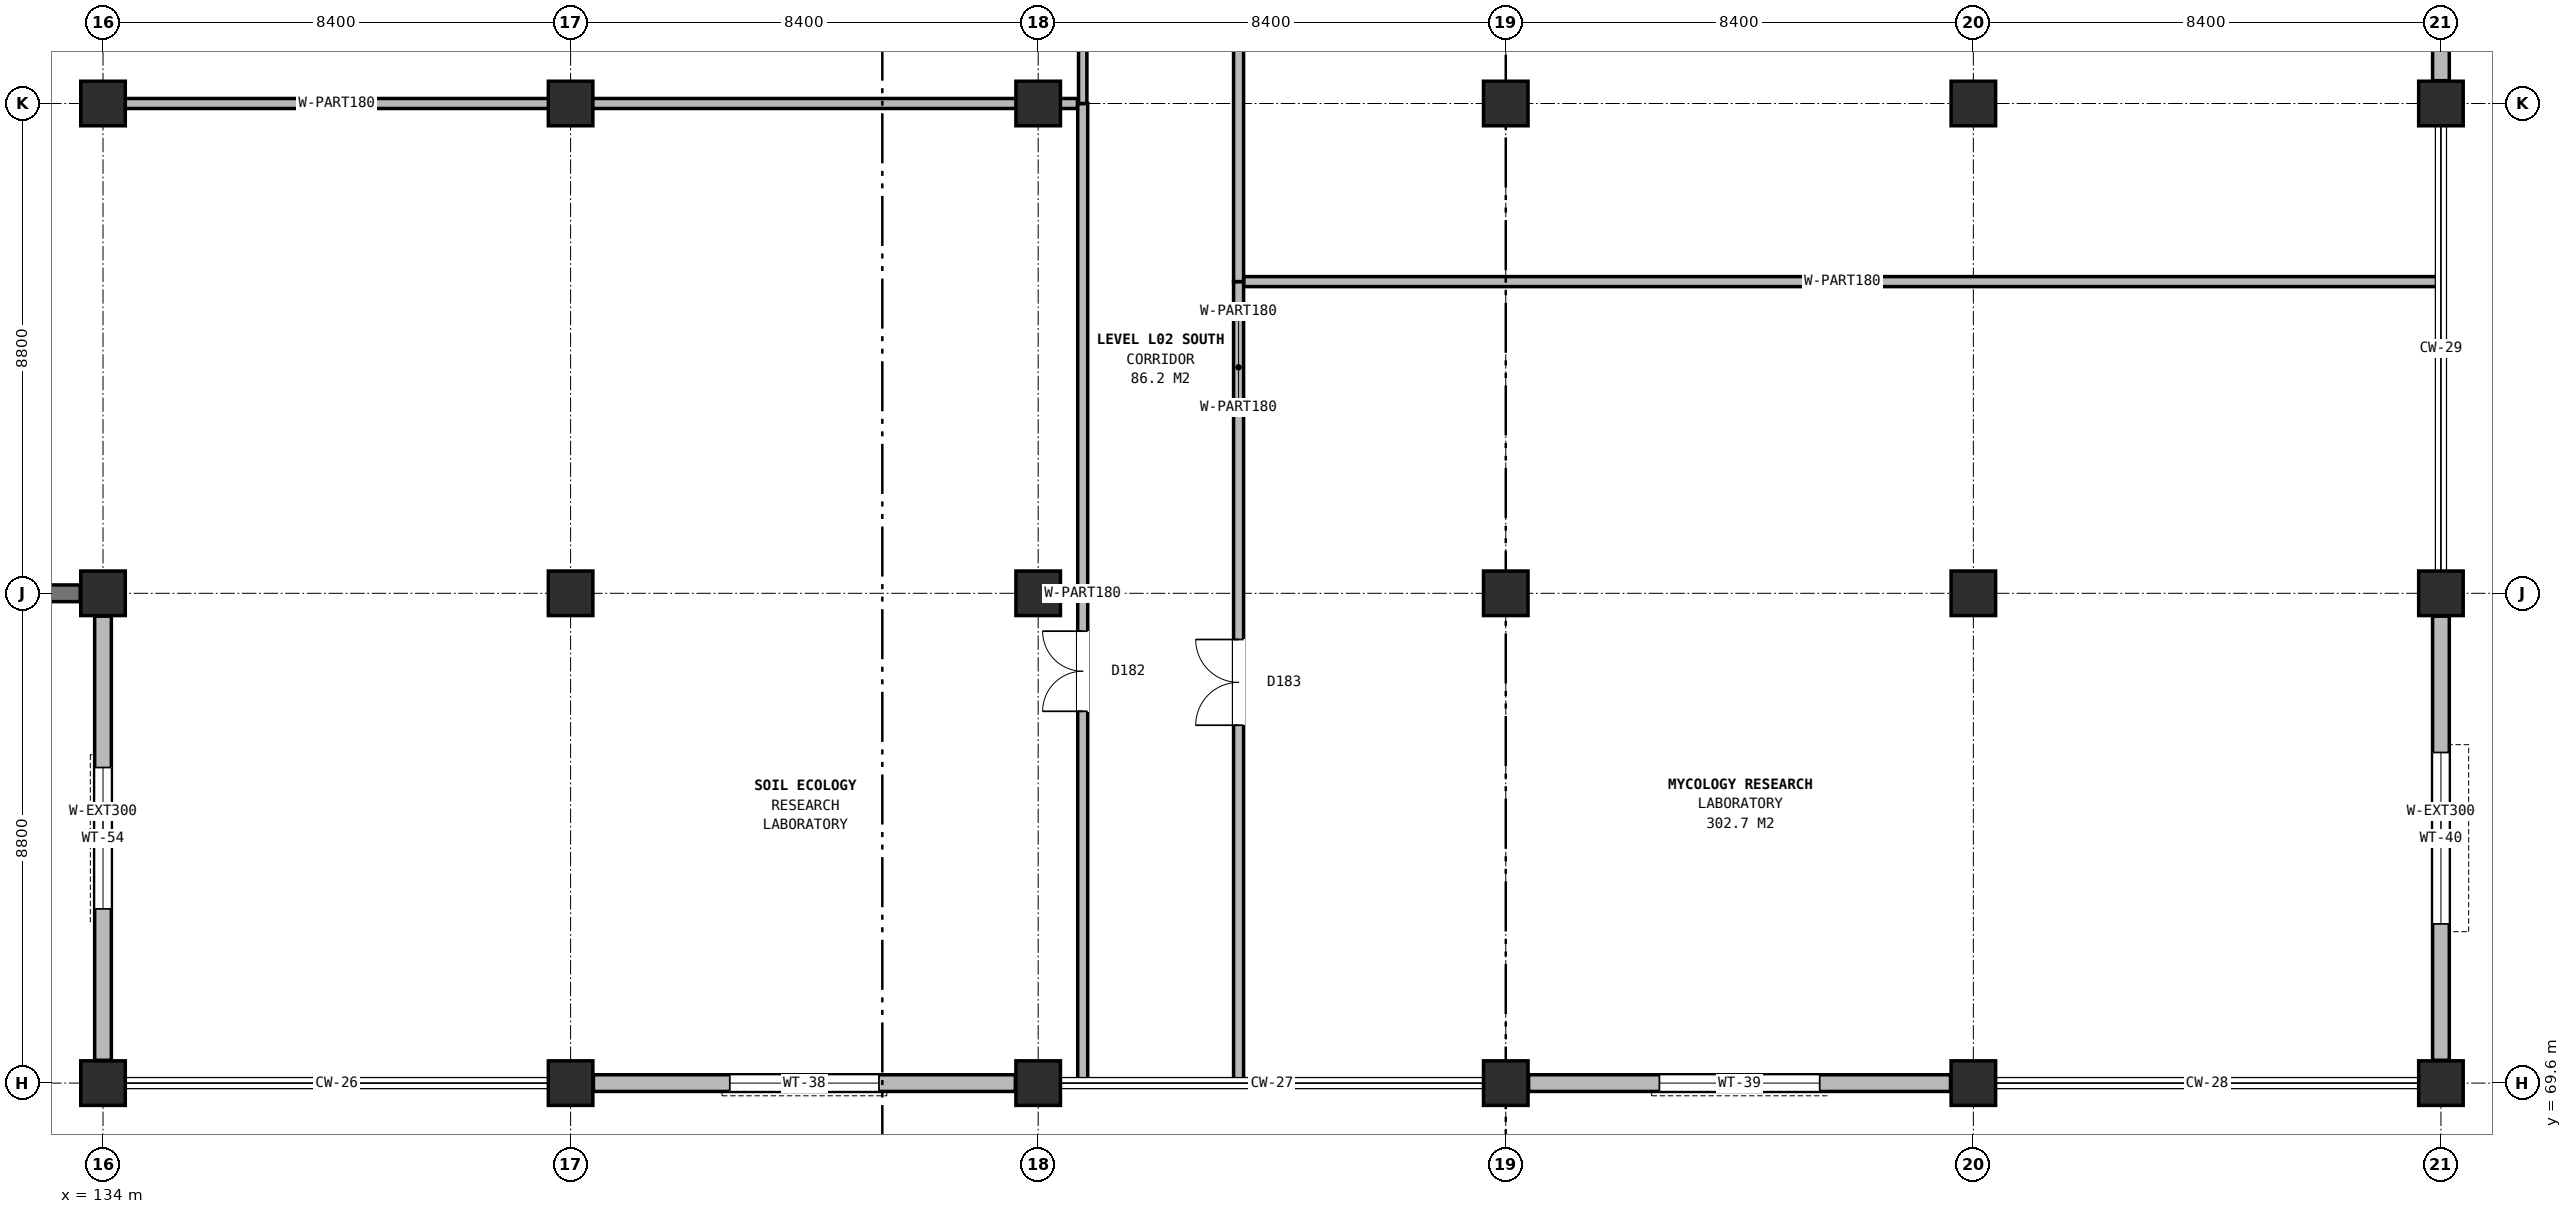
"""IFC4 building model, lengths in metres.
Left out: names, types, materials, properties, quantities, classifications, styles, units other than length and angle.
Written with IfcOpenShell. Run it as: python <this file> out.ifc"""

import sys

from ifc_helpers import new_model, si_unit, direction, frame, frame_2d, origin, origin_2d, place, context, subcontext, project, spatial, rectangle, extrude, element, fill, save


model = new_model("IFC4")
c1 = context("Model", 3, precision=1e-05, world=origin(), true_north=direction((0.0, 1.0)))
c2 = subcontext(c1, "Body", "Model", "MODEL_VIEW")
j1 = project(units=[si_unit("LENGTHUNIT", "METRE"), si_unit("PLANEANGLEUNIT", "RADIAN")], contexts=[c1])
p1 = place(None, origin())
s1 = spatial("IfcSite", under=j1, at=p1, CompositionType="ELEMENT")
p2 = place(p1, origin())
s2 = spatial("IfcBuilding", under=s1, at=p2, CompositionType="ELEMENT")
p3 = place(p2, frame((0.0, 0.0, 9.0)))
s3 = spatial("IfcBuildingStorey", under=s2, at=p3, CompositionType="ELEMENT", Elevation=9.0)
for number, where, z_axis, x_axis in (
    (1, (134.0, 69.6, 0.0), (0.0, 0.0, 1.0), (1.0, 0.0, 0.0)),
    (2, (134.0, 78.4, 0.0), (0.0, 0.0, 1.0), (1.0, 0.0, 0.0)),
    (3, (134.0, 87.2, 0.0), (0.0, 0.0, 1.0), (1.0, 0.0, 0.0)),
    (4, (142.4, 69.6, 0.0), (0.0, 0.0, 1.0), (1.0, 0.0, 0.0)),
    (5, (142.4, 78.4, 0.0), (0.0, 0.0, 1.0), (1.0, 0.0, 0.0)),
    (6, (142.4, 87.2, 0.0), (0.0, 0.0, 1.0), (1.0, 0.0, 0.0)),
    (7, (150.8, 69.6, 0.0), (0.0, 0.0, 1.0), (1.0, 0.0, 0.0)),
    (8, (150.8, 78.4, 0.0), (0.0, 0.0, 1.0), (1.0, 0.0, 0.0)),
    (9, (150.8, 87.2, 0.0), (0.0, 0.0, 1.0), (1.0, 0.0, 0.0)),
    (10, (159.2, 69.6, 0.0), (0.0, 0.0, 1.0), (1.0, 0.0, 0.0)),
    (11, (159.2, 78.4, 0.0), (0.0, 0.0, 1.0), (1.0, 0.0, 0.0)),
    (12, (159.2, 87.2, 0.0), (0.0, 0.0, 1.0), (1.0, 0.0, 0.0)),
    (13, (167.6, 69.6, 0.0), (0.0, 0.0, 1.0), (1.0, 0.0, 0.0)),
    (14, (167.6, 78.4, 0.0), (0.0, 0.0, 1.0), (1.0, 0.0, 0.0)),
    (15, (167.6, 87.2, 0.0), (0.0, 0.0, 1.0), (1.0, 0.0, 0.0)),
    (16, (176.0, 69.6, 0.0), (0.0, 0.0, 1.0), (1.0, 0.0, 0.0)),
    (17, (176.0, 78.4, 0.0), (0.0, 0.0, 1.0), (1.0, 0.0, 0.0)),
    (18, (176.0, 87.2, 0.0), (0.0, 0.0, 1.0), (1.0, 0.0, 0.0)),
):
    element("IfcColumn", number, at=place(p3, frame(where, z_axis=z_axis, x_axis=x_axis)), inside=s3, PredefinedType="COLUMN", context=c2, shape_type="SweptSolid", body=[
        extrude(rectangle(XDim=0.8, YDim=0.8, at=origin_2d()), origin(), (0.0, 0.0, 1.0), 4.2),
    ])
p4 = place(p3, frame((142.81, 69.6, 0.0), z_axis=(0.0, 0.0, 1.0), x_axis=(1.0, 0.0, 0.0)))
e19 = element("IfcWall", 19, at=p4, inside=s3, PredefinedType="SOLIDWALL", context=c2, shape_type="SweptSolid", body=[
    extrude(rectangle(XDim=7.58, YDim=0.3, at=frame_2d((3.79, 0.0))), origin(), (0.0, 0.0, 1.0), 3.45),
])
p5 = place(p4, frame((2.45, 0.0, 0.9)))
e20 = element("IfcOpeningElement", 20, at=p5, cuts=e19, PredefinedType="OPENING", context=c2, shape_type="SweptSolid", body=[
    extrude(rectangle(XDim=2.68, YDim=2.12, at=frame_2d((1.34, 1.06))), frame((0.0, 0.16, 0.0), z_axis=(0.0, -1.0, 0.0), x_axis=(1.0, 0.0, 0.0)), (0.0, 0.0, 1.0), 0.32),
])
p6 = place(p3, frame((159.61, 69.6, 0.0), z_axis=(0.0, 0.0, 1.0), x_axis=(1.0, 0.0, 0.0)))
e21 = element("IfcWall", 21, at=p6, inside=s3, PredefinedType="SOLIDWALL", context=c2, shape_type="SweptSolid", body=[
    extrude(rectangle(XDim=7.58, YDim=0.3, at=frame_2d((3.79, 0.0))), origin(), (0.0, 0.0, 1.0), 3.45),
])
p7 = place(p6, frame((2.35, 0.0, 0.9)))
e22 = element("IfcOpeningElement", 22, at=p7, cuts=e21, PredefinedType="OPENING", context=c2, shape_type="SweptSolid", body=[
    extrude(rectangle(XDim=2.88, YDim=2.14, at=frame_2d((1.44, 1.07))), frame((0.0, 0.16, 0.0), z_axis=(0.0, -1.0, 0.0), x_axis=(1.0, 0.0, 0.0)), (0.0, 0.0, 1.0), 0.32),
])
p8 = place(p3, frame((176.0, 70.01, 0.0), z_axis=(0.0, 0.0, 1.0), x_axis=(0.0, 1.0, 0.0)))
e23 = element("IfcWall", 23, at=p8, inside=s3, PredefinedType="SOLIDWALL", context=c2, shape_type="SweptSolid", body=[
    extrude(rectangle(XDim=7.98, YDim=0.3, at=frame_2d((3.99, 0.0))), origin(), (0.0, 0.0, 1.0), 3.45),
])
p9 = place(p8, frame((2.45, 0.0, 0.9)))
e24 = element("IfcOpeningElement", 24, at=p9, cuts=e23, PredefinedType="OPENING", context=c2, shape_type="SweptSolid", body=[
    extrude(rectangle(XDim=3.08, YDim=2.18, at=frame_2d((1.54, 1.09))), frame((0.0, 0.16, 0.0), z_axis=(0.0, -1.0, 0.0), x_axis=(1.0, 0.0, 0.0)), (0.0, 0.0, 1.0), 0.32),
])
p10 = place(p3, frame((176.0, 87.61, 0.0), z_axis=(0.0, 0.0, 1.0), x_axis=(0.0, 1.0, 0.0)))
e25 = element("IfcWall", 25, at=p10, inside=s3, PredefinedType="SOLIDWALL", context=c2, shape_type="SweptSolid", body=[
    extrude(rectangle(XDim=7.98, YDim=0.3, at=frame_2d((3.99, 0.0))), origin(), (0.0, 0.0, 1.0), 3.45),
])
p11 = place(p10, frame((3.3, 0.0, 0.9)))
e26 = element("IfcOpeningElement", 26, at=p11, cuts=e25, PredefinedType="OPENING", context=c2, shape_type="SweptSolid", body=[
    extrude(rectangle(XDim=1.38, YDim=2.24, at=frame_2d((0.69, 1.12))), frame((0.0, 0.16, 0.0), z_axis=(0.0, -1.0, 0.0), x_axis=(1.0, 0.0, 0.0)), (0.0, 0.0, 1.0), 0.32),
])
p12 = place(p3, frame((126.01, 78.4, 0.0), z_axis=(0.0, 0.0, 1.0), x_axis=(1.0, 0.0, 0.0)))
e27 = element("IfcWall", 27, at=p12, inside=s3, PredefinedType="SHEAR", context=c2, shape_type="SweptSolid", body=[
    extrude(rectangle(XDim=7.58, YDim=0.3, at=frame_2d((3.79, 0.0))), origin(), (0.0, 0.0, 1.0), 3.25),
])
p13 = place(p3, frame((134.0, 77.99, 0.0), z_axis=(0.0, 0.0, 1.0), x_axis=(0.0, -1.0, 0.0)))
e28 = element("IfcWall", 28, at=p13, inside=s3, PredefinedType="SOLIDWALL", context=c2, shape_type="SweptSolid", body=[
    extrude(rectangle(XDim=7.98, YDim=0.3, at=frame_2d((3.99, 0.0))), origin(), (0.0, 0.0, 1.0), 3.25),
])
p14 = place(p13, frame((2.72, 0.0, 0.9)))
e29 = element("IfcOpeningElement", 29, at=p14, cuts=e28, PredefinedType="OPENING", context=c2, shape_type="SweptSolid", body=[
    extrude(rectangle(XDim=2.54, YDim=2.16, at=frame_2d((1.27, 1.08))), frame((0.0, 0.16, 0.0), z_axis=(0.0, -1.0, 0.0), x_axis=(1.0, 0.0, 0.0)), (0.0, 0.0, 1.0), 0.32),
])
p15 = place(p3, frame((151.6, 69.6, 0.0), z_axis=(0.0, 0.0, 1.0), x_axis=(0.0, 1.0, 0.0)))
e30 = element("IfcWall", 30, at=p15, inside=s3, PredefinedType="PARTITIONING", context=c2, shape_type="SweptSolid", body=[
    extrude(rectangle(XDim=17.6, YDim=0.18, at=frame_2d((8.8, 0.0))), origin(), (0.0, 0.0, 1.0), 3.865),
])
p16 = place(p15, frame((6.68, 0.0, 0.0)))
e31 = element("IfcOpeningElement", 31, at=p16, cuts=e30, PredefinedType="OPENING", context=c2, shape_type="SweptSolid", body=[
    extrude(rectangle(XDim=1.44, YDim=2.26, at=frame_2d((0.72, 1.13))), frame((0.0, 0.1, 0.0), z_axis=(0.0, -1.0, 0.0), x_axis=(1.0, 0.0, 0.0)), (0.0, 0.0, 1.0), 0.2),
])
p17 = place(p3, frame((154.4, 69.6, 0.0), z_axis=(0.0, 0.0, 1.0), x_axis=(0.0, 1.0, 0.0)))
e32 = element("IfcWall", 32, at=p17, inside=s3, PredefinedType="PARTITIONING", context=c2, shape_type="SweptSolid", body=[
    extrude(rectangle(XDim=14.4, YDim=0.18, at=frame_2d((7.2, 0.0))), origin(), (0.0, 0.0, 1.0), 3.865),
])
p18 = place(p17, frame((6.43, 0.0, 0.0)))
e33 = element("IfcOpeningElement", 33, at=p18, cuts=e32, PredefinedType="OPENING", context=c2, shape_type="SweptSolid", body=[
    extrude(rectangle(XDim=1.54, YDim=2.3, at=frame_2d((0.77, 1.15))), frame((0.0, 0.1, 0.0), z_axis=(0.0, -1.0, 0.0), x_axis=(1.0, 0.0, 0.0)), (0.0, 0.0, 1.0), 0.2),
])
p19 = place(p3, frame((154.4, 84.0, 0.0), z_axis=(0.0, 0.0, 1.0), x_axis=(0.0, 1.0, 0.0)))
e34 = element("IfcWall", 34, at=p19, inside=s3, PredefinedType="PARTITIONING", context=c2, shape_type="SweptSolid", body=[
    extrude(rectangle(XDim=18.305, YDim=0.18, at=frame_2d((9.152, 0.0))), origin(), (0.0, 0.0, 1.0), 3.865),
])
p20 = place(p3, frame((151.6, 87.2, 0.0), z_axis=(0.0, 0.0, 1.0), x_axis=(0.0, 1.0, 0.0)))
e35 = element("IfcWall", 35, at=p20, inside=s3, PredefinedType="PARTITIONING", context=c2, shape_type="SweptSolid", body=[
    extrude(rectangle(XDim=15.12, YDim=0.15, at=frame_2d((7.56, 0.0))), origin(), (0.0, 0.0, 1.0), 3.865),
])
p21 = place(p3, frame((134.4, 87.2, 0.0), z_axis=(0.0, 0.0, 1.0), x_axis=(1.0, 0.0, 0.0)))
e36 = element("IfcWall", 36, at=p21, inside=s3, PredefinedType="PARTITIONING", context=c2, shape_type="SweptSolid", body=[
    extrude(rectangle(XDim=17.105, YDim=0.18, at=frame_2d((8.552, 0.0))), origin(), (0.0, 0.0, 1.0), 3.245),
])
p22 = place(p3, frame((154.495, 84.0, 0.0), z_axis=(0.0, 0.0, 1.0), x_axis=(1.0, 0.0, 0.0)))
e37 = element("IfcWall", 37, at=p22, inside=s3, PredefinedType="PARTITIONING", context=c2, shape_type="SweptSolid", body=[
    extrude(rectangle(XDim=21.505, YDim=0.18, at=frame_2d((10.752, 0.0))), origin(), (0.0, 0.0, 1.0), 3.865),
])
p23 = place(p5, origin())
e38 = element("IfcWindow", 38, at=p23, inside=s3, PartitioningType="SINGLE_PANEL", PredefinedType="WINDOW", context=c2, shape_type="SweptSolid", body=[
    extrude(rectangle(XDim=2.68, YDim=2.12, at=frame_2d((1.34, 1.06))), frame((0.0, 0.03, 0.0), z_axis=(0.0, -1.0, 0.0), x_axis=(1.0, 0.0, 0.0)), (0.0, 0.0, 1.0), 0.06),
])
fill(e20, e38)
p24 = place(p7, origin())
e39 = element("IfcWindow", 39, at=p24, inside=s3, PartitioningType="SINGLE_PANEL", PredefinedType="WINDOW", context=c2, shape_type="SweptSolid", body=[
    extrude(rectangle(XDim=2.88, YDim=2.14, at=frame_2d((1.44, 1.07))), frame((0.0, 0.03, 0.0), z_axis=(0.0, -1.0, 0.0), x_axis=(1.0, 0.0, 0.0)), (0.0, 0.0, 1.0), 0.06),
])
fill(e22, e39)
p25 = place(p9, origin())
e40 = element("IfcWindow", 40, at=p25, inside=s3, PartitioningType="SINGLE_PANEL", PredefinedType="WINDOW", context=c2, shape_type="SweptSolid", body=[
    extrude(rectangle(XDim=3.08, YDim=2.18, at=frame_2d((1.54, 1.09))), frame((0.0, 0.03, 0.0), z_axis=(0.0, -1.0, 0.0), x_axis=(1.0, 0.0, 0.0)), (0.0, 0.0, 1.0), 0.06),
])
fill(e24, e40)
p26 = place(p14, origin())
e41 = element("IfcWindow", 41, at=p26, inside=s3, PartitioningType="SINGLE_PANEL", PredefinedType="WINDOW", context=c2, shape_type="SweptSolid", body=[
    extrude(rectangle(XDim=2.54, YDim=2.16, at=frame_2d((1.27, 1.08))), frame((0.0, 0.03, 0.0), z_axis=(0.0, -1.0, 0.0), x_axis=(1.0, 0.0, 0.0)), (0.0, 0.0, 1.0), 0.06),
])
fill(e29, e41)
p27 = place(p16, origin())
e42 = element("IfcDoor", 42, at=p27, inside=s3, OperationType="DOUBLE_DOOR_SINGLE_SWING", PredefinedType="DOOR", context=c2, shape_type="SweptSolid", body=[
    extrude(rectangle(XDim=1.44, YDim=2.26, at=frame_2d((0.72, 1.13))), frame((0.0, 0.025, 0.0), z_axis=(0.0, -1.0, 0.0), x_axis=(1.0, 0.0, 0.0)), (0.0, 0.0, 1.0), 0.05),
])
fill(e31, e42)
p28 = place(p18, origin())
e43 = element("IfcDoor", 43, at=p28, inside=s3, OperationType="DOUBLE_DOOR_SINGLE_SWING", PredefinedType="DOOR", context=c2, shape_type="SweptSolid", body=[
    extrude(rectangle(XDim=1.54, YDim=2.3, at=frame_2d((0.77, 1.15))), frame((0.0, 0.025, 0.0), z_axis=(0.0, -1.0, 0.0), x_axis=(1.0, 0.0, 0.0)), (0.0, 0.0, 1.0), 0.05),
])
fill(e33, e43)
save(model, sys.argv[1])
